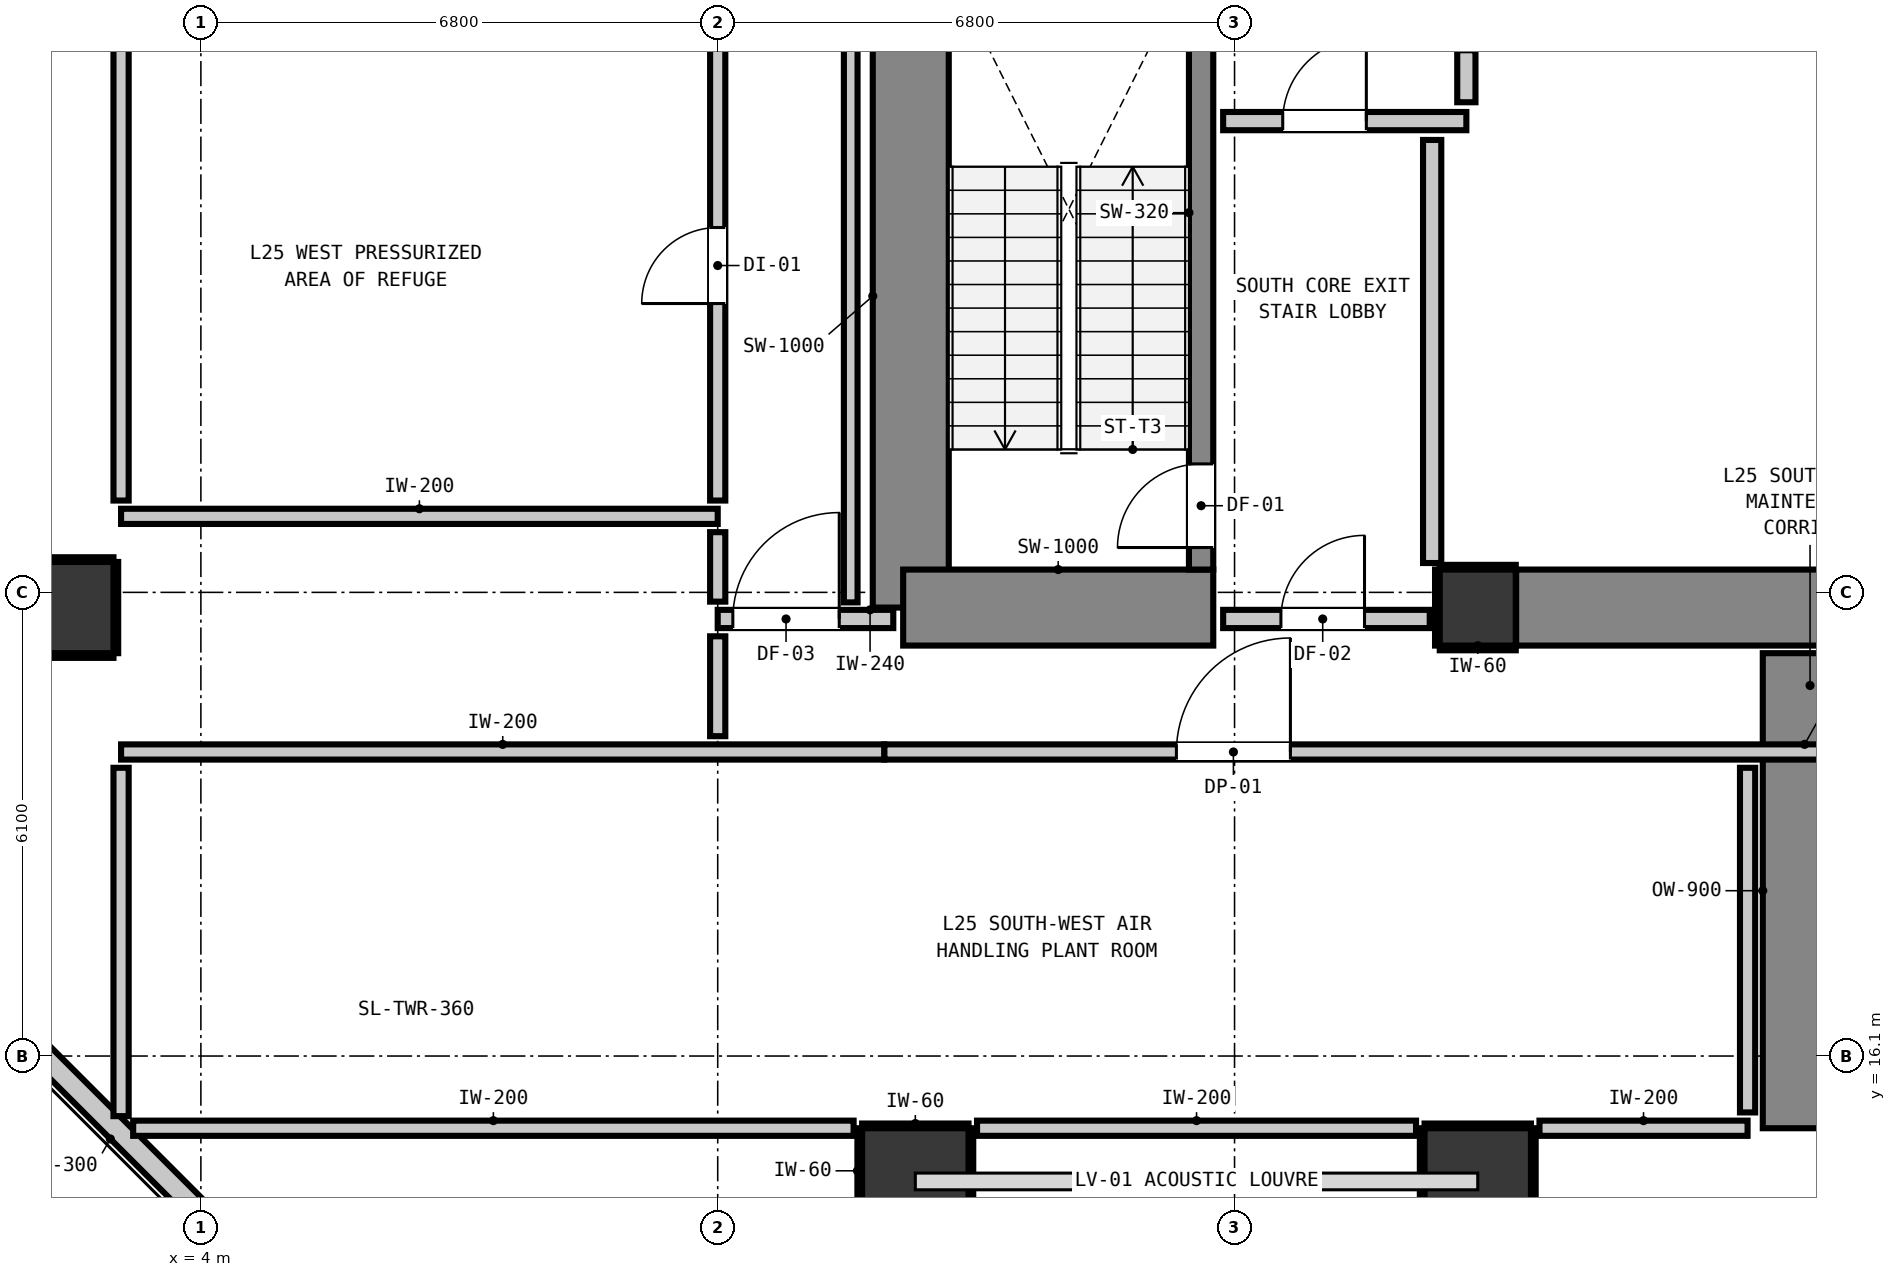
"""IFC4 building model, lengths in metres.
Left out: names, types, materials, properties, quantities, classifications, styles, units other than length and angle.
Written with IfcOpenShell. Run it as: python <this file> out.ifc"""

import sys

from ifc_helpers import new_model, si_unit, direction, frame, frame_2d, origin, origin_2d, place, context, subcontext, project, spatial, rectangle, extrude, element, fill, save


model = new_model("IFC4")
c1 = context("Model", 3, precision=1e-05, world=origin(), true_north=direction((0.0, 1.0)))
c2 = subcontext(c1, "Body", "Model", "MODEL_VIEW")
j1 = project(units=[si_unit("LENGTHUNIT", "METRE"), si_unit("PLANEANGLEUNIT", "RADIAN")], contexts=[c1])
p1 = place(None, origin())
s1 = spatial("IfcSite", under=j1, at=p1, CompositionType="ELEMENT")
p2 = place(p1, origin())
s2 = spatial("IfcBuilding", under=s1, at=p2, CompositionType="ELEMENT")
p3 = place(p2, frame((0.0, 0.0, 88.4)))
s3 = spatial("IfcBuildingStorey", under=s2, at=p3, CompositionType="ELEMENT", Elevation=88.4)
p4 = place(p3, frame((20.8, 22.0, 0.0), z_axis=(0.0, 0.0, 1.0), x_axis=(1.0, 0.0, 0.0)))
e1 = element("IfcColumn", 1, at=p4, inside=s3, PredefinedType="COLUMN", context=c2, shape_type="SweptSolid", body=[
    extrude(rectangle(XDim=1.0, YDim=1.0, at=origin_2d()), origin(), (0.0, 0.0, 1.0), 4.4),
])
p5 = place(p3, frame((13.34, 22.0, 0.0), z_axis=(0.0, 0.0, 1.0), x_axis=(0.0, 1.0, 0.0)))
e2 = element("IfcWall", 2, at=p5, inside=s3, PredefinedType="SHEAR", context=c2, shape_type="SweptSolid", body=[
    extrude(rectangle(XDim=8.195, YDim=1.0, at=frame_2d((4.098, 0.0))), origin(), (0.0, 0.0, 1.0), 4.4),
])
p6 = place(p3, frame((13.24, 22.0, 0.0), z_axis=(0.0, 0.0, 1.0), x_axis=(1.0, 0.0, 0.0)))
e3 = element("IfcWall", 3, at=p6, inside=s3, PredefinedType="SHEAR", context=c2, shape_type="SweptSolid", body=[
    extrude(rectangle(XDim=4.08, YDim=1.0, at=frame_2d((2.04, 0.0))), origin(), (0.0, 0.0, 1.0), 4.4),
])
p7 = place(p3, frame((21.305, 22.0, 0.0), z_axis=(0.0, 0.0, 1.0), x_axis=(1.0, 0.0, 0.0)))
e4 = element("IfcWall", 4, at=p7, inside=s3, PredefinedType="SHEAR", context=c2, shape_type="SweptSolid", body=[
    extrude(rectangle(XDim=7.39, YDim=1.0, at=frame_2d((3.695, 0.0))), origin(), (0.0, 0.0, 1.0), 4.4),
])
p8 = place(p3, frame((17.16, 22.5, 0.0), z_axis=(0.0, 0.0, 1.0), x_axis=(0.0, 1.0, 0.0)))
e5 = element("IfcWall", 5, at=p8, inside=s3, PredefinedType="SHEAR", context=c2, shape_type="SweptSolid", body=[
    extrude(rectangle(XDim=7.9, YDim=0.32, at=frame_2d((3.95, 0.0))), origin(), (0.0, 0.0, 1.0), 4.4),
])
p9 = place(p8, frame((0.29, 0.0, 0.0)))
e6 = element("IfcOpeningElement", 6, at=p9, cuts=e5, PredefinedType="OPENING", context=c2, shape_type="SweptSolid", body=[
    extrude(rectangle(XDim=1.1, YDim=2.15, at=frame_2d((0.55, 1.075))), frame((0.0, 0.17, 0.0), z_axis=(0.0, -1.0, 0.0), x_axis=(1.0, 0.0, 0.0)), (0.0, 0.0, 1.0), 0.34),
])
for number, where, z_axis, x_axis in (
    (7, (13.4, 14.45, 0.0), (0.0, 0.0, 1.0), (1.0, 0.0, 0.0)),
    (8, (20.8, 14.45, 0.0), (0.0, 0.0, 1.0), (1.0, 0.0, 0.0)),
):
    element("IfcColumn", number, at=place(p3, frame(where, z_axis=z_axis, x_axis=x_axis)), inside=s3, PredefinedType="COLUMN", context=c2, shape_type="SweptSolid", body=[
        extrude(rectangle(XDim=1.4, YDim=1.4, at=origin_2d()), origin(), (0.0, 0.0, 1.0), 4.4),
    ])
p10 = place(p3, frame((2.25, 22.0, 0.0), z_axis=(0.0, 0.0, 1.0), x_axis=(1.0, 0.0, 0.0)))
e9 = element("IfcColumn", 9, at=p10, inside=s3, PredefinedType="COLUMN", context=c2, shape_type="SweptSolid", body=[
    extrude(rectangle(XDim=1.2, YDim=1.2, at=origin_2d()), origin(), (0.0, 0.0, 1.0), 4.4),
])
p11 = place(p3, frame((25.0, 15.15, 0.0), z_axis=(0.0, 0.0, 1.0), x_axis=(0.0, 1.0, 0.0)))
e10 = element("IfcWall", 10, at=p11, inside=s3, PredefinedType="SHEAR", context=c2, shape_type="SweptSolid", body=[
    extrude(rectangle(XDim=6.25, YDim=0.9, at=frame_2d((3.125, 0.0))), origin(), (0.0, 0.0, 1.0), 4.14),
])
p12 = place(p3, frame((4.165, 13.865, 0.0), z_axis=(0.0, 0.0, 1.0), x_axis=(-0.707106781187, 0.707106781187, 0.0)))
e11 = element("IfcWall", 11, at=p12, inside=s3, PredefinedType="STANDARD", context=c2, shape_type="SweptSolid", body=[
    extrude(rectangle(XDim=3.536, YDim=0.3, at=frame_2d((1.768, 0.0))), origin(), (0.0, 0.0, 1.0), 4.14),
])
p13 = place(p3, frame((10.8, 21.85, 0.0), z_axis=(0.0, 0.0, 1.0), x_axis=(1.0, 0.0, 0.0)))
e12 = element("IfcWall", 12, at=p13, inside=s3, PredefinedType="PARTITIONING", context=c2, shape_type="SweptSolid", body=[
    extrude(rectangle(XDim=2.31, YDim=0.24, at=frame_2d((1.155, 0.0))), origin(), (0.0, 0.0, 1.0), 3.878),
])
p14 = place(p13, frame((0.199, 0.0, 0.0)))
e13 = element("IfcOpeningElement", 13, at=p14, cuts=e12, PredefinedType="OPENING", context=c2, shape_type="SweptSolid", body=[
    extrude(rectangle(XDim=1.4, YDim=2.15, at=frame_2d((0.7, 1.075))), frame((0.0, 0.13, 0.0), z_axis=(0.0, -1.0, 0.0), x_axis=(1.0, 0.0, 0.0)), (0.0, 0.0, 1.0), 0.26),
])
p15 = place(p3, frame((17.45, 21.85, 0.0), z_axis=(0.0, 0.0, 1.0), x_axis=(1.0, 0.0, 0.0)))
e14 = element("IfcWall", 14, at=p15, inside=s3, PredefinedType="PARTITIONING", context=c2, shape_type="SweptSolid", body=[
    extrude(rectangle(XDim=2.718, YDim=0.24, at=frame_2d((1.359, 0.0))), origin(), (0.0, 0.0, 1.0), 3.878),
])
p16 = place(p15, frame((0.76, 0.0, 0.0)))
e15 = element("IfcOpeningElement", 15, at=p16, cuts=e14, PredefinedType="OPENING", context=c2, shape_type="SweptSolid", body=[
    extrude(rectangle(XDim=1.1, YDim=2.15, at=frame_2d((0.55, 1.075))), frame((0.0, 0.13, 0.0), z_axis=(0.0, -1.0, 0.0), x_axis=(1.0, 0.0, 0.0)), (0.0, 0.0, 1.0), 0.26),
])
p17 = place(p3, frame((17.45, 28.4, 0.0), z_axis=(0.0, 0.0, 1.0), x_axis=(1.0, 0.0, 0.0)))
e16 = element("IfcWall", 16, at=p17, inside=s3, PredefinedType="PARTITIONING", context=c2, shape_type="SweptSolid", body=[
    extrude(rectangle(XDim=3.2, YDim=0.24, at=frame_2d((1.6, 0.0))), origin(), (0.0, 0.0, 1.0), 4.14),
])
p18 = place(p17, frame((0.784, 0.0, 0.0)))
e17 = element("IfcOpeningElement", 17, at=p18, cuts=e16, PredefinedType="OPENING", context=c2, shape_type="SweptSolid", body=[
    extrude(rectangle(XDim=1.1, YDim=2.15, at=frame_2d((0.55, 1.075))), frame((0.0, 0.13, 0.0), z_axis=(0.0, -1.0, 0.0), x_axis=(1.0, 0.0, 0.0)), (0.0, 0.0, 1.0), 0.26),
])
p19 = place(p3, frame((3.109, 15.15, 0.0), z_axis=(0.0, 0.0, 1.0), x_axis=(1.0, 0.0, 0.0)))
e18 = element("IfcWall", 18, at=p19, inside=s3, PredefinedType="PARTITIONING", context=c2, shape_type="SweptSolid", body=[
    extrude(rectangle(XDim=9.479, YDim=0.2, at=frame_2d((4.74, 0.0))), origin(), (0.0, 0.0, 1.0), 3.525),
])
p20 = place(p3, frame((14.212, 15.15, 0.0), z_axis=(0.0, 0.0, 1.0), x_axis=(1.0, 0.0, 0.0)))
e19 = element("IfcWall", 19, at=p20, inside=s3, PredefinedType="PARTITIONING", context=c2, shape_type="SweptSolid", body=[
    extrude(rectangle(XDim=5.776, YDim=0.2, at=frame_2d((2.888, 0.0))), origin(), (0.0, 0.0, 1.0), 4.14),
])
p21 = place(p3, frame((21.612, 15.15, 0.0), z_axis=(0.0, 0.0, 1.0), x_axis=(1.0, 0.0, 0.0)))
e20 = element("IfcWall", 20, at=p21, inside=s3, PredefinedType="PARTITIONING", context=c2, shape_type="SweptSolid", body=[
    extrude(rectangle(XDim=2.738, YDim=0.2, at=frame_2d((1.369, 0.0))), origin(), (0.0, 0.0, 1.0), 4.14),
])
p22 = place(p3, frame((2.95, 20.1, 0.0), z_axis=(0.0, 0.0, 1.0), x_axis=(1.0, 0.0, 0.0)))
e21 = element("IfcWall", 21, at=p22, inside=s3, PredefinedType="PARTITIONING", context=c2, shape_type="SweptSolid", body=[
    extrude(rectangle(XDim=10.043, YDim=0.2, at=frame_2d((5.021, 0.0))), origin(), (0.0, 0.0, 1.0), 3.525),
])
p23 = place(p3, frame((12.993, 20.1, 0.0), z_axis=(0.0, 0.0, 1.0), x_axis=(1.0, 0.0, 0.0)))
e22 = element("IfcWall", 22, at=p23, inside=s3, PredefinedType="PARTITIONING", context=c2, shape_type="SweptSolid", body=[
    extrude(rectangle(XDim=29.857, YDim=0.2, at=frame_2d((14.929, 0.0))), origin(), (0.0, 0.0, 1.0), 4.14),
])
p24 = place(p23, frame((18.872, 0.0, 0.0)))
e23 = element("IfcOpeningElement", 23, at=p24, cuts=e22, PredefinedType="OPENING", context=c2, shape_type="SweptSolid", body=[
    extrude(rectangle(XDim=1.0, YDim=2.15, at=frame_2d((0.5, 1.075))), frame((0.0, 0.11, 0.0), z_axis=(0.0, -1.0, 0.0), x_axis=(1.0, 0.0, 0.0)), (0.0, 0.0, 1.0), 0.22),
])
p25 = place(p23, frame((3.842, 0.0, 0.0)))
e24 = element("IfcOpeningElement", 24, at=p25, cuts=e22, PredefinedType="OPENING", context=c2, shape_type="SweptSolid", body=[
    extrude(rectangle(XDim=1.5, YDim=2.15, at=frame_2d((0.75, 1.075))), frame((0.0, 0.11, 0.0), z_axis=(0.0, -1.0, 0.0), x_axis=(1.0, 0.0, 0.0)), (0.0, 0.0, 1.0), 0.22),
])
p26 = place(p3, frame((2.95, 23.2, 0.0), z_axis=(0.0, 0.0, 1.0), x_axis=(1.0, 0.0, 0.0)))
e25 = element("IfcWall", 25, at=p26, inside=s3, PredefinedType="PARTITIONING", context=c2, shape_type="SweptSolid", body=[
    extrude(rectangle(XDim=7.85, YDim=0.2, at=frame_2d((3.925, 0.0))), origin(), (0.0, 0.0, 1.0), 4.14),
])
p27 = place(p3, frame((20.2, 22.586, 0.0), z_axis=(0.0, 0.0, 1.0), x_axis=(0.0, 1.0, 0.0)))
e26 = element("IfcWall", 26, at=p27, inside=s3, PredefinedType="PARTITIONING", context=c2, shape_type="SweptSolid", body=[
    extrude(rectangle(XDim=5.566, YDim=0.24, at=frame_2d((2.783, 0.0))), origin(), (0.0, 0.0, 1.0), 4.14),
])
p28 = place(p3, frame((20.65, 28.648, 0.0), z_axis=(0.0, 0.0, 1.0), x_axis=(0.0, 1.0, 0.0)))
e27 = element("IfcWall", 27, at=p28, inside=s3, PredefinedType="PARTITIONING", context=c2, shape_type="SweptSolid", body=[
    extrude(rectangle(XDim=0.684, YDim=0.24, at=frame_2d((0.342, 0.0))), origin(), (0.0, 0.0, 1.0), 3.375),
])
p29 = place(p3, frame((2.95, 15.309, 0.0), z_axis=(0.0, 0.0, 1.0), x_axis=(0.0, 1.0, 0.0)))
e28 = element("IfcWall", 28, at=p29, inside=s3, PredefinedType="PARTITIONING", context=c2, shape_type="SweptSolid", body=[
    extrude(rectangle(XDim=4.583, YDim=0.2, at=frame_2d((2.292, 0.0))), origin(), (0.0, 0.0, 1.0), 4.14),
])
p30 = place(p3, frame((2.95, 23.408, 0.0), z_axis=(0.0, 0.0, 1.0), x_axis=(0.0, 1.0, 0.0)))
e29 = element("IfcWall", 29, at=p30, inside=s3, PredefinedType="PARTITIONING", context=c2, shape_type="SweptSolid", body=[
    extrude(rectangle(XDim=6.184, YDim=0.2, at=frame_2d((3.092, 0.0))), origin(), (0.0, 0.0, 1.0), 4.14),
])
p31 = place(p3, frame((10.8, 20.308, 0.0), z_axis=(0.0, 0.0, 1.0), x_axis=(0.0, 1.0, 0.0)))
e30 = element("IfcWall", 30, at=p31, inside=s3, PredefinedType="PARTITIONING", context=c2, shape_type="SweptSolid", body=[
    extrude(rectangle(XDim=1.314, YDim=0.2, at=frame_2d((0.657, 0.0))), origin(), (0.0, 0.0, 1.0), 4.14),
])
p32 = place(p3, frame((10.8, 22.078, 0.0), z_axis=(0.0, 0.0, 1.0), x_axis=(0.0, 1.0, 0.0)))
e31 = element("IfcWall", 31, at=p32, inside=s3, PredefinedType="PARTITIONING", context=c2, shape_type="SweptSolid", body=[
    extrude(rectangle(XDim=0.914, YDim=0.2, at=frame_2d((0.457, 0.0))), origin(), (0.0, 0.0, 1.0), 4.14),
])
p33 = place(p3, frame((10.8, 23.408, 0.0), z_axis=(0.0, 0.0, 1.0), x_axis=(0.0, 1.0, 0.0)))
e32 = element("IfcWall", 32, at=p33, inside=s3, PredefinedType="PARTITIONING", context=c2, shape_type="SweptSolid", body=[
    extrude(rectangle(XDim=6.184, YDim=0.2, at=frame_2d((3.092, 0.0))), origin(), (0.0, 0.0, 1.0), 4.14),
])
p34 = place(p33, frame((2.592, 0.0, 0.0)))
e33 = element("IfcOpeningElement", 33, at=p34, cuts=e32, PredefinedType="OPENING", context=c2, shape_type="SweptSolid", body=[
    extrude(rectangle(XDim=1.0, YDim=2.15, at=frame_2d((0.5, 1.075))), frame((0.0, 0.11, 0.0), z_axis=(0.0, -1.0, 0.0), x_axis=(1.0, 0.0, 0.0)), (0.0, 0.0, 1.0), 0.22),
])
p35 = place(p3, frame((24.35, 15.358, 0.0), z_axis=(0.0, 0.0, 1.0), x_axis=(0.0, 1.0, 0.0)))
e34 = element("IfcWall", 34, at=p35, inside=s3, PredefinedType="PARTITIONING", context=c2, shape_type="SweptSolid", body=[
    extrude(rectangle(XDim=4.534, YDim=0.2, at=frame_2d((2.267, 0.0))), origin(), (0.0, 0.0, 1.0), 4.14),
])
p36 = place(p3, frame((12.55, 22.068, 0.0), z_axis=(0.0, 0.0, 1.0), x_axis=(0.0, 1.0, 0.0)))
e35 = element("IfcWall", 35, at=p36, inside=s3, PredefinedType="PARTITIONING", context=c2, shape_type="SweptSolid", body=[
    extrude(rectangle(XDim=17.294, YDim=0.18, at=frame_2d((8.647, 0.0))), origin(), (0.0, 0.0, 1.0), 4.14),
])
for number, where, z_axis, x_axis in (
    (36, (20.3, 21.468, 0.0), (0.0, 0.0, 1.0), (1.0, 0.0, 0.0)),
    (37, (20.3, 22.532, 0.0), (0.0, 0.0, 1.0), (1.0, 0.0, 0.0)),
    (38, (20.268, 21.5, 0.0), (0.0, 0.0, 1.0), (0.0, 1.0, 0.0)),
):
    element("IfcWall", number, at=place(p3, frame(where, z_axis=z_axis, x_axis=x_axis)), inside=s3, PredefinedType="PARTITIONING", context=c2, shape_type="SweptSolid", body=[
        extrude(rectangle(XDim=1.0, YDim=0.06, at=frame_2d((0.5, 0.0))), origin(), (0.0, 0.0, 1.0), 1.45),
    ])
p37 = place(p3, frame((12.7, 15.182, 0.0), z_axis=(0.0, 0.0, 1.0), x_axis=(1.0, 0.0, 0.0)))
e39 = element("IfcWall", 39, at=p37, inside=s3, PredefinedType="PARTITIONING", context=c2, shape_type="SweptSolid", body=[
    extrude(rectangle(XDim=1.4, YDim=0.06, at=frame_2d((0.7, 0.0))), origin(), (0.0, 0.0, 1.0), 1.45),
])
for number, where, z_axis, x_axis in (
    (40, (12.668, 14.03, 0.0), (0.0, 0.0, 1.0), (0.0, 1.0, 0.0)),
    (41, (14.132, 14.03, 0.0), (0.0, 0.0, 1.0), (0.0, 1.0, 0.0)),
):
    element("IfcWall", number, at=place(p3, frame(where, z_axis=z_axis, x_axis=x_axis)), inside=s3, PredefinedType="PARTITIONING", context=c2, shape_type="SweptSolid", body=[
        extrude(rectangle(XDim=1.12, YDim=0.06, at=frame_2d((0.56, 0.0))), origin(), (0.0, 0.0, 1.0), 1.45),
    ])
p38 = place(p3, frame((20.1, 15.182, 0.0), z_axis=(0.0, 0.0, 1.0), x_axis=(1.0, 0.0, 0.0)))
e42 = element("IfcWall", 42, at=p38, inside=s3, PredefinedType="PARTITIONING", context=c2, shape_type="SweptSolid", body=[
    extrude(rectangle(XDim=1.4, YDim=0.06, at=frame_2d((0.7, 0.0))), origin(), (0.0, 0.0, 1.0), 1.45),
])
for number, where, z_axis, x_axis in (
    (43, (20.068, 14.03, 0.0), (0.0, 0.0, 1.0), (0.0, 1.0, 0.0)),
    (44, (21.532, 14.03, 0.0), (0.0, 0.0, 1.0), (0.0, 1.0, 0.0)),
):
    element("IfcWall", number, at=place(p3, frame(where, z_axis=z_axis, x_axis=x_axis)), inside=s3, PredefinedType="PARTITIONING", context=c2, shape_type="SweptSolid", body=[
        extrude(rectangle(XDim=1.12, YDim=0.06, at=frame_2d((0.56, 0.0))), origin(), (0.0, 0.0, 1.0), 1.45),
    ])
for number, where, z_axis, x_axis in (
    (45, (1.83, 21.368, 0.0), (0.0, 0.0, 1.0), (1.0, 0.0, 0.0)),
    (46, (1.83, 22.632, 0.0), (0.0, 0.0, 1.0), (1.0, 0.0, 0.0)),
):
    element("IfcWall", number, at=place(p3, frame(where, z_axis=z_axis, x_axis=x_axis)), inside=s3, PredefinedType="PARTITIONING", context=c2, shape_type="SweptSolid", body=[
        extrude(rectangle(XDim=1.02, YDim=0.06, at=frame_2d((0.51, 0.0))), origin(), (0.0, 0.0, 1.0), 1.45),
    ])
p39 = place(p3, frame((2.882, 21.4, 0.0), z_axis=(0.0, 0.0, 1.0), x_axis=(0.0, 1.0, 0.0)))
e47 = element("IfcWall", 47, at=p39, inside=s3, PredefinedType="PARTITIONING", context=c2, shape_type="SweptSolid", body=[
    extrude(rectangle(XDim=1.2, YDim=0.06, at=frame_2d((0.6, 0.0))), origin(), (0.0, 0.0, 1.0), 1.45),
])
p40 = place(p9, origin())
e48 = element("IfcDoor", 48, at=p40, inside=s3, OperationType="SINGLE_SWING_LEFT", PredefinedType="DOOR", context=c2, shape_type="SweptSolid", body=[
    extrude(rectangle(XDim=1.1, YDim=2.15, at=frame_2d((0.55, 1.075))), frame((0.0, 0.025, 0.0), z_axis=(0.0, -1.0, 0.0), x_axis=(1.0, 0.0, 0.0)), (0.0, 0.0, 1.0), 0.05),
])
fill(e6, e48)
p41 = place(p18, origin())
e49 = element("IfcDoor", 49, at=p41, inside=s3, OperationType="SINGLE_SWING_RIGHT", PredefinedType="DOOR", context=c2, shape_type="SweptSolid", body=[
    extrude(rectangle(XDim=1.1, YDim=2.15, at=frame_2d((0.55, 1.075))), frame((0.0, 0.025, 0.0), z_axis=(0.0, -1.0, 0.0), x_axis=(1.0, 0.0, 0.0)), (0.0, 0.0, 1.0), 0.05),
])
fill(e17, e49)
p42 = place(p16, origin())
e50 = element("IfcDoor", 50, at=p42, inside=s3, OperationType="SINGLE_SWING_RIGHT", PredefinedType="DOOR", context=c2, shape_type="SweptSolid", body=[
    extrude(rectangle(XDim=1.1, YDim=2.15, at=frame_2d((0.55, 1.075))), frame((0.0, 0.025, 0.0), z_axis=(0.0, -1.0, 0.0), x_axis=(1.0, 0.0, 0.0)), (0.0, 0.0, 1.0), 0.05),
])
fill(e15, e50)
p43 = place(p14, origin())
e51 = element("IfcDoor", 51, at=p43, inside=s3, OperationType="SINGLE_SWING_RIGHT", PredefinedType="DOOR", context=c2, shape_type="SweptSolid", body=[
    extrude(rectangle(XDim=1.4, YDim=2.15, at=frame_2d((0.7, 1.075))), frame((0.0, 0.025, 0.0), z_axis=(0.0, -1.0, 0.0), x_axis=(1.0, 0.0, 0.0)), (0.0, 0.0, 1.0), 0.05),
])
fill(e13, e51)
p44 = place(p34, origin())
e52 = element("IfcDoor", 52, at=p44, inside=s3, OperationType="SINGLE_SWING_LEFT", PredefinedType="DOOR", context=c2, shape_type="SweptSolid", body=[
    extrude(rectangle(XDim=1.0, YDim=2.15, at=frame_2d((0.5, 1.075))), frame((0.0, 0.025, 0.0), z_axis=(0.0, -1.0, 0.0), x_axis=(1.0, 0.0, 0.0)), (0.0, 0.0, 1.0), 0.05),
])
fill(e33, e52)
p45 = place(p25, origin())
e53 = element("IfcDoor", 53, at=p45, inside=s3, OperationType="SINGLE_SWING_RIGHT", PredefinedType="DOOR", context=c2, shape_type="SweptSolid", body=[
    extrude(rectangle(XDim=1.5, YDim=2.15, at=frame_2d((0.75, 1.075))), frame((0.0, 0.025, 0.0), z_axis=(0.0, -1.0, 0.0), x_axis=(1.0, 0.0, 0.0)), (0.0, 0.0, 1.0), 0.05),
])
fill(e24, e53)
save(model, sys.argv[1])
